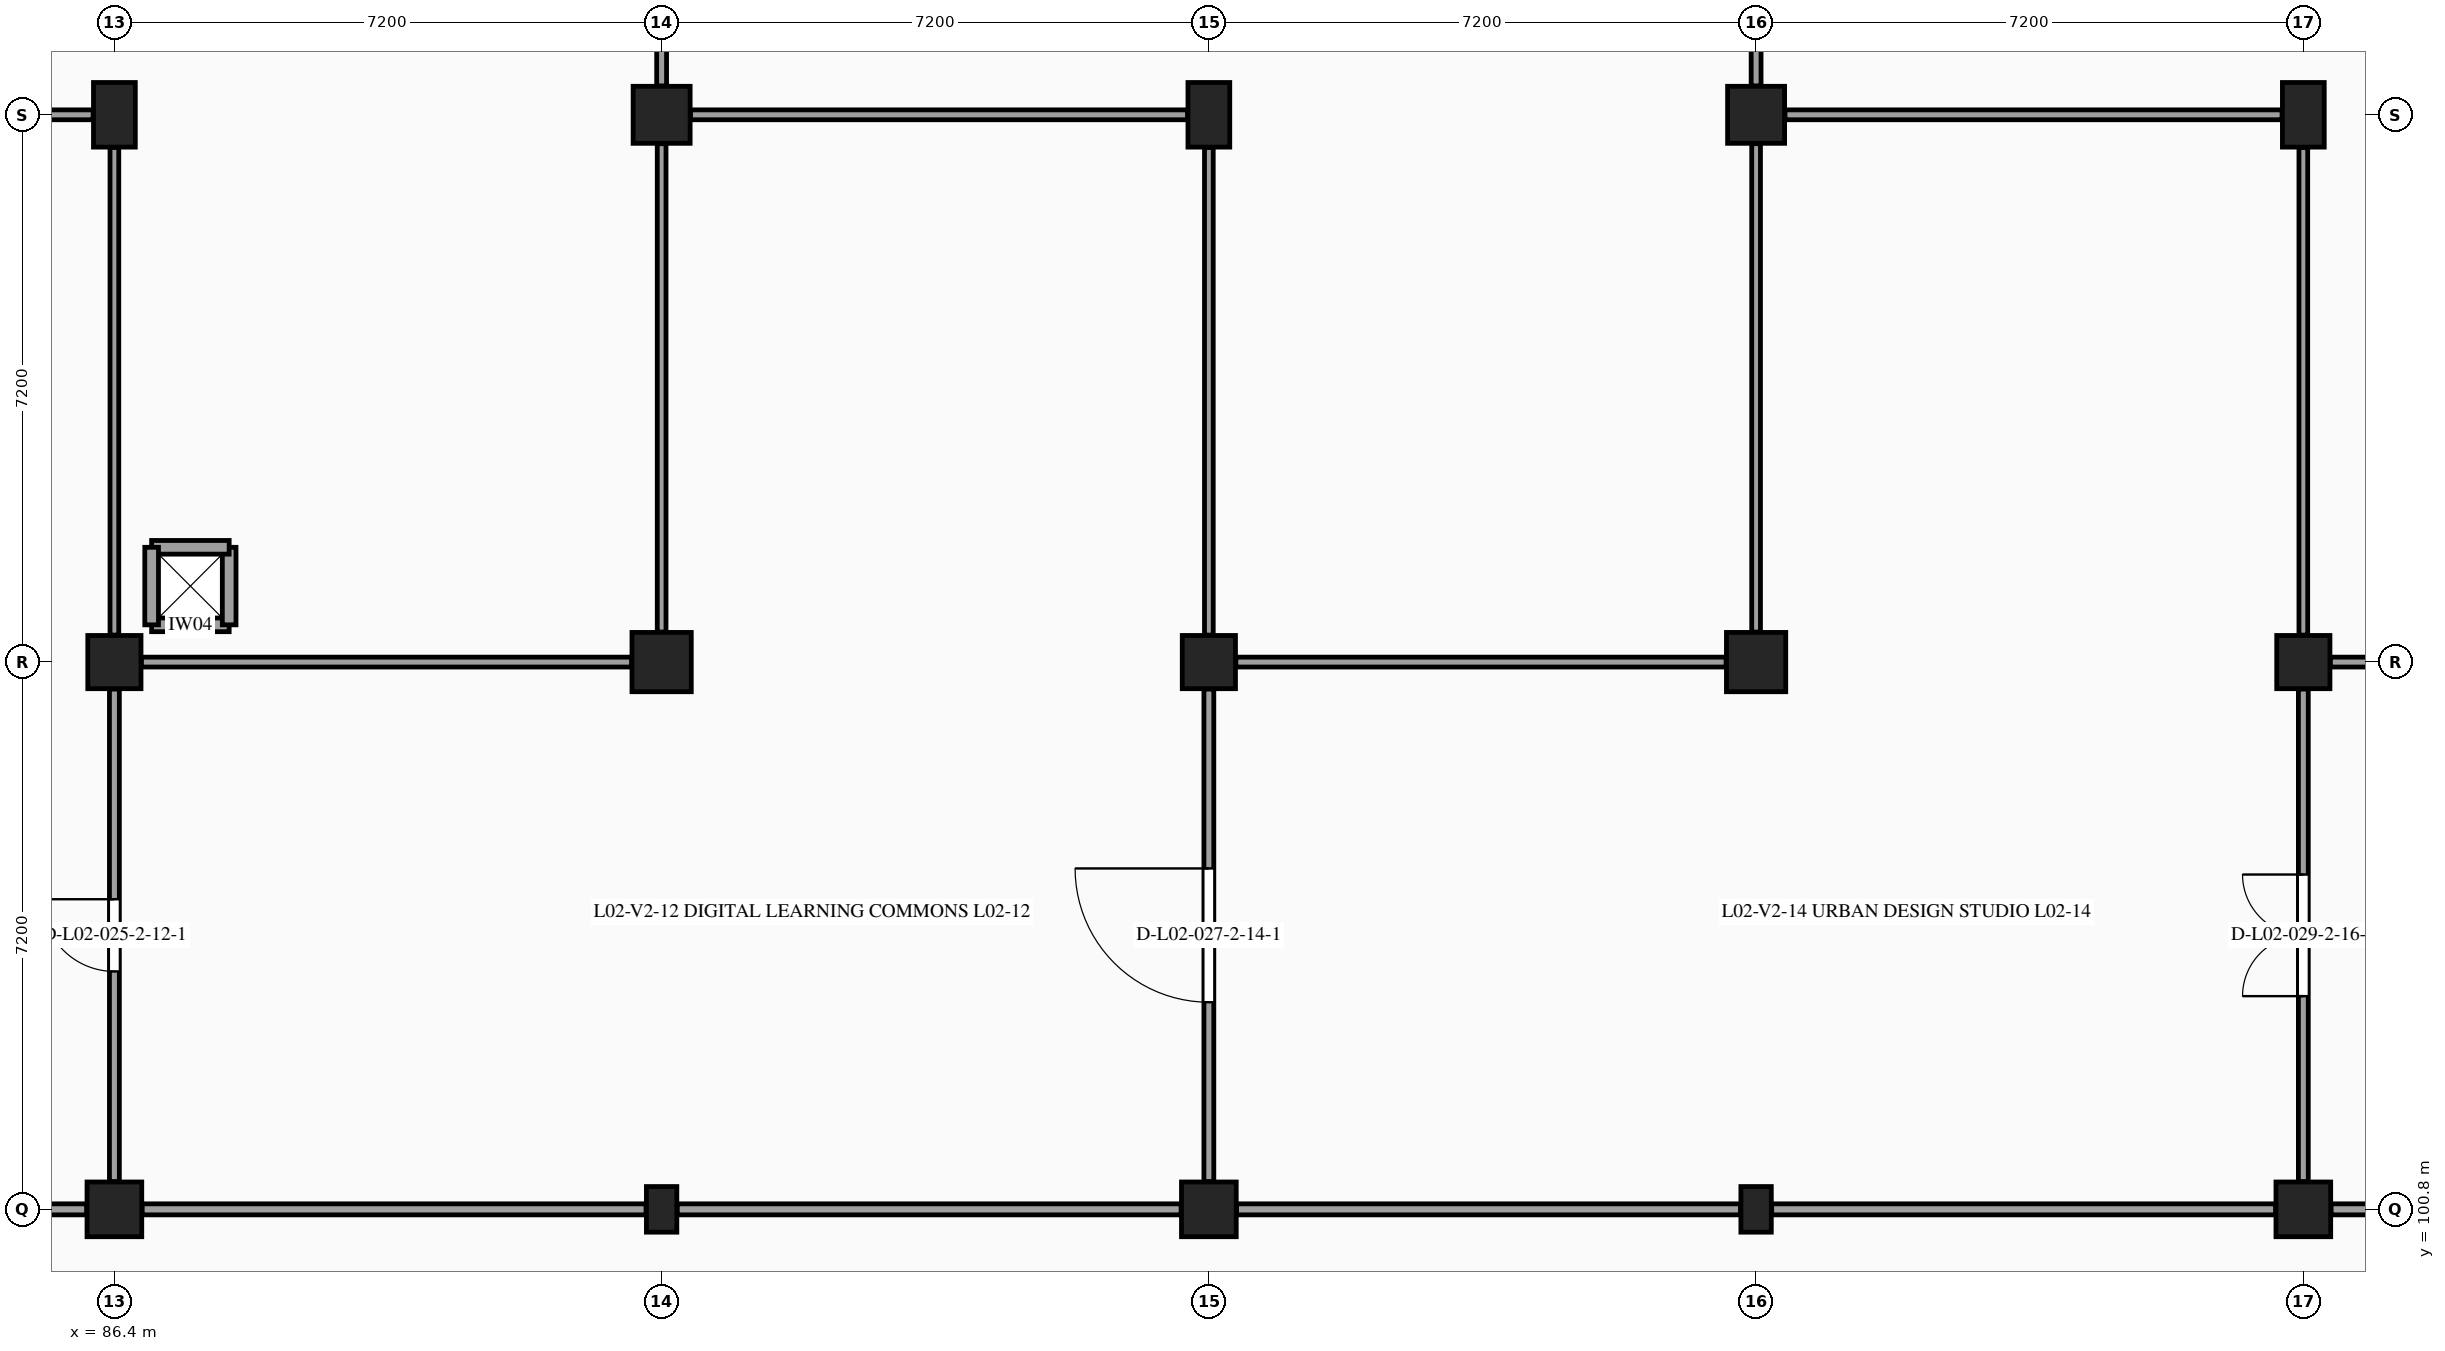
"""IFC4 building model, lengths in metres.
Left out: names, types, materials, properties, quantities, classifications, styles, units other than length and angle.
Written with IfcOpenShell. Run it as: python <this file> out.ifc"""

import sys

from ifc_helpers import new_model, si_unit, direction, frame, frame_2d, origin, origin_2d, place, context, subcontext, project, spatial, rectangle, extrude, element, fill, save


model = new_model("IFC4")
c1 = context("Model", 3, precision=1e-05, world=origin(), true_north=direction((0.0, 1.0)))
c2 = subcontext(c1, "Body", "Model", "MODEL_VIEW")
j1 = project(units=[si_unit("LENGTHUNIT", "METRE"), si_unit("PLANEANGLEUNIT", "RADIAN")], contexts=[c1])
p1 = place(None, origin())
s1 = spatial("IfcSite", under=j1, at=p1, CompositionType="ELEMENT")
p2 = place(p1, origin())
s2 = spatial("IfcBuilding", under=s1, at=p2, CompositionType="ELEMENT")
p3 = place(p2, frame((0.0, 0.0, 9.9)))
s3 = spatial("IfcBuildingStorey", under=s2, at=p3, CompositionType="ELEMENT", Elevation=9.9)
p4 = place(p3, frame((86.4, 100.8, 0.0), z_axis=(0.0, 0.0, 1.0), x_axis=(1.0, 0.0, 0.0)))
e1 = element("IfcColumn", 1, at=p4, inside=s3, PredefinedType="COLUMN", context=c2, shape_type="SweptSolid", body=[
    extrude(rectangle(XDim=0.72, YDim=0.72, at=origin_2d()), origin(), (0.0, 0.0, 1.0), 4.5),
])
p5 = place(p3, frame((86.4, 108.0, 0.0), z_axis=(0.0, 0.0, 1.0), x_axis=(1.0, 0.0, 0.0)))
e2 = element("IfcColumn", 2, at=p5, inside=s3, PredefinedType="COLUMN", context=c2, shape_type="SweptSolid", body=[
    extrude(rectangle(XDim=0.7, YDim=0.7, at=origin_2d()), origin(), (0.0, 0.0, 1.0), 4.5),
])
p6 = place(p3, frame((86.4, 115.2, 0.0), z_axis=(0.0, 0.0, 1.0), x_axis=(1.0, 0.0, 0.0)))
e3 = element("IfcColumn", 3, at=p6, inside=s3, PredefinedType="COLUMN", context=c2, shape_type="SweptSolid", body=[
    extrude(rectangle(XDim=0.55, YDim=0.85, at=origin_2d()), origin(), (0.0, 0.0, 1.0), 4.5),
])
p7 = place(p3, frame((93.6, 100.8, 0.0), z_axis=(0.0, 0.0, 1.0), x_axis=(1.0, 0.0, 0.0)))
e4 = element("IfcColumn", 4, at=p7, inside=s3, PredefinedType="PILASTER", context=c2, shape_type="SweptSolid", body=[
    extrude(rectangle(XDim=0.4, YDim=0.6, at=origin_2d()), origin(), (0.0, 0.0, 1.0), 4.5),
])
p8 = place(p3, frame((93.6, 108.0, 0.0), z_axis=(0.0, 0.0, 1.0), x_axis=(1.0, 0.0, 0.0)))
e5 = element("IfcColumn", 5, at=p8, inside=s3, PredefinedType="COLUMN", context=c2, shape_type="SweptSolid", body=[
    extrude(rectangle(XDim=0.78, YDim=0.78, at=origin_2d()), origin(), (0.0, 0.0, 1.0), 4.5),
])
p9 = place(p3, frame((93.6, 115.2, 0.0), z_axis=(0.0, 0.0, 1.0), x_axis=(1.0, 0.0, 0.0)))
e6 = element("IfcColumn", 6, at=p9, inside=s3, PredefinedType="COLUMN", context=c2, shape_type="SweptSolid", body=[
    extrude(rectangle(XDim=0.75, YDim=0.75, at=origin_2d()), origin(), (0.0, 0.0, 1.0), 4.5),
])
p10 = place(p3, frame((100.8, 100.8, 0.0), z_axis=(0.0, 0.0, 1.0), x_axis=(1.0, 0.0, 0.0)))
e7 = element("IfcColumn", 7, at=p10, inside=s3, PredefinedType="COLUMN", context=c2, shape_type="SweptSolid", body=[
    extrude(rectangle(XDim=0.72, YDim=0.72, at=origin_2d()), origin(), (0.0, 0.0, 1.0), 4.5),
])
p11 = place(p3, frame((100.8, 108.0, 0.0), z_axis=(0.0, 0.0, 1.0), x_axis=(1.0, 0.0, 0.0)))
e8 = element("IfcColumn", 8, at=p11, inside=s3, PredefinedType="COLUMN", context=c2, shape_type="SweptSolid", body=[
    extrude(rectangle(XDim=0.7, YDim=0.7, at=origin_2d()), origin(), (0.0, 0.0, 1.0), 4.5),
])
p12 = place(p3, frame((100.8, 115.2, 0.0), z_axis=(0.0, 0.0, 1.0), x_axis=(1.0, 0.0, 0.0)))
e9 = element("IfcColumn", 9, at=p12, inside=s3, PredefinedType="COLUMN", context=c2, shape_type="SweptSolid", body=[
    extrude(rectangle(XDim=0.55, YDim=0.85, at=origin_2d()), origin(), (0.0, 0.0, 1.0), 4.5),
])
p13 = place(p3, frame((108.0, 100.8, 0.0), z_axis=(0.0, 0.0, 1.0), x_axis=(1.0, 0.0, 0.0)))
e10 = element("IfcColumn", 10, at=p13, inside=s3, PredefinedType="PILASTER", context=c2, shape_type="SweptSolid", body=[
    extrude(rectangle(XDim=0.4, YDim=0.6, at=origin_2d()), origin(), (0.0, 0.0, 1.0), 4.5),
])
p14 = place(p3, frame((108.0, 108.0, 0.0), z_axis=(0.0, 0.0, 1.0), x_axis=(1.0, 0.0, 0.0)))
e11 = element("IfcColumn", 11, at=p14, inside=s3, PredefinedType="COLUMN", context=c2, shape_type="SweptSolid", body=[
    extrude(rectangle(XDim=0.78, YDim=0.78, at=origin_2d()), origin(), (0.0, 0.0, 1.0), 4.5),
])
p15 = place(p3, frame((108.0, 115.2, 0.0), z_axis=(0.0, 0.0, 1.0), x_axis=(1.0, 0.0, 0.0)))
e12 = element("IfcColumn", 12, at=p15, inside=s3, PredefinedType="COLUMN", context=c2, shape_type="SweptSolid", body=[
    extrude(rectangle(XDim=0.75, YDim=0.75, at=origin_2d()), origin(), (0.0, 0.0, 1.0), 4.5),
])
p16 = place(p3, frame((115.2, 100.8, 0.0), z_axis=(0.0, 0.0, 1.0), x_axis=(1.0, 0.0, 0.0)))
e13 = element("IfcColumn", 13, at=p16, inside=s3, PredefinedType="COLUMN", context=c2, shape_type="SweptSolid", body=[
    extrude(rectangle(XDim=0.72, YDim=0.72, at=origin_2d()), origin(), (0.0, 0.0, 1.0), 4.5),
])
p17 = place(p3, frame((115.2, 108.0, 0.0), z_axis=(0.0, 0.0, 1.0), x_axis=(1.0, 0.0, 0.0)))
e14 = element("IfcColumn", 14, at=p17, inside=s3, PredefinedType="COLUMN", context=c2, shape_type="SweptSolid", body=[
    extrude(rectangle(XDim=0.7, YDim=0.7, at=origin_2d()), origin(), (0.0, 0.0, 1.0), 4.5),
])
p18 = place(p3, frame((115.2, 115.2, 0.0), z_axis=(0.0, 0.0, 1.0), x_axis=(1.0, 0.0, 0.0)))
e15 = element("IfcColumn", 15, at=p18, inside=s3, PredefinedType="COLUMN", context=c2, shape_type="SweptSolid", body=[
    extrude(rectangle(XDim=0.55, YDim=0.85, at=origin_2d()), origin(), (0.0, 0.0, 1.0), 4.5),
])
for number, where, z_axis, x_axis in (
    (16, (86.89, 108.49, 0.0), (0.0, 0.0, 1.0), (1.0, 0.0, 0.0)),
    (17, (87.91, 108.49, 0.0), (0.0, 0.0, 1.0), (0.0, 1.0, 0.0)),
    (18, (87.91, 109.51, 0.0), (0.0, 0.0, 1.0), (-1.0, 0.0, 0.0)),
    (19, (86.89, 109.51, 0.0), (0.0, 0.0, 1.0), (0.0, -1.0, 0.0)),
):
    element("IfcWall", number, at=place(p3, frame(where, z_axis=z_axis, x_axis=x_axis)), inside=s3, PredefinedType="PARTITIONING", context=c2, shape_type="SweptSolid", body=[
        extrude(rectangle(XDim=1.02, YDim=0.18, at=frame_2d((0.51, 0.0))), origin(), (0.0, 0.0, 1.0), 4.225),
    ])
p19 = place(p3, frame((79.405, 100.8, 0.0), z_axis=(0.0, 0.0, 1.0), x_axis=(1.0, 0.0, 0.0)))
e20 = element("IfcWall", 20, at=p19, inside=s3, PredefinedType="PARTITIONING", context=c2, shape_type="SweptSolid", body=[
    extrude(rectangle(XDim=6.63, YDim=0.145, at=frame_2d((3.315, 0.0))), origin(), (0.0, 0.0, 1.0), 3.5),
])
p20 = place(p3, frame((86.4, 101.165, 0.0), z_axis=(0.0, 0.0, 1.0), x_axis=(0.0, 1.0, 0.0)))
e21 = element("IfcWall", 21, at=p20, inside=s3, PredefinedType="PARTITIONING", context=c2, shape_type="SweptSolid", body=[
    extrude(rectangle(XDim=6.48, YDim=0.13, at=frame_2d((3.24, 0.0))), origin(), (0.0, 0.0, 1.0), 3.54),
])
p21 = place(p20, frame((2.765, 0.0, 0.0)))
e22 = element("IfcOpeningElement", 22, at=p21, cuts=e21, PredefinedType="OPENING", context=c2, shape_type="SweptSolid", body=[
    extrude(rectangle(XDim=0.95, YDim=2.15, at=frame_2d((0.475, 1.075))), frame((0.0, 0.075, 0.0), z_axis=(0.0, -1.0, 0.0), x_axis=(1.0, 0.0, 0.0)), (0.0, 0.0, 1.0), 0.15),
])
p22 = place(p3, frame((86.4, 108.355, 0.0), z_axis=(0.0, 0.0, 1.0), x_axis=(0.0, 1.0, 0.0)))
e23 = element("IfcWall", 23, at=p22, inside=s3, PredefinedType="PARTITIONING", context=c2, shape_type="SweptSolid", body=[
    extrude(rectangle(XDim=6.415, YDim=0.115, at=frame_2d((3.208, 0.0))), origin(), (0.0, 0.0, 1.0), 3.535),
])
p23 = place(p3, frame((79.58, 115.2, 0.0), z_axis=(0.0, 0.0, 1.0), x_axis=(1.0, 0.0, 0.0)))
e24 = element("IfcWall", 24, at=p23, inside=s3, PredefinedType="PARTITIONING", context=c2, shape_type="SweptSolid", body=[
    extrude(rectangle(XDim=6.54, YDim=0.13, at=frame_2d((3.27, 0.0))), origin(), (0.0, 0.0, 1.0), 3.5),
])
p24 = place(p3, frame((86.765, 100.8, 0.0), z_axis=(0.0, 0.0, 1.0), x_axis=(1.0, 0.0, 0.0)))
e25 = element("IfcWall", 25, at=p24, inside=s3, PredefinedType="PARTITIONING", context=c2, shape_type="SweptSolid", body=[
    extrude(rectangle(XDim=6.63, YDim=0.145, at=frame_2d((3.315, 0.0))), origin(), (0.0, 0.0, 1.0), 3.505),
])
p25 = place(p3, frame((86.755, 108.0, 0.0), z_axis=(0.0, 0.0, 1.0), x_axis=(1.0, 0.0, 0.0)))
e26 = element("IfcWall", 26, at=p25, inside=s3, PredefinedType="PARTITIONING", context=c2, shape_type="SweptSolid", body=[
    extrude(rectangle(XDim=6.45, YDim=0.13, at=frame_2d((3.225, 0.0))), origin(), (0.0, 0.0, 1.0), 3.505),
])
p26 = place(p3, frame((93.6, 108.395, 0.0), z_axis=(0.0, 0.0, 1.0), x_axis=(0.0, 1.0, 0.0)))
e27 = element("IfcWall", 27, at=p26, inside=s3, PredefinedType="PARTITIONING", context=c2, shape_type="SweptSolid", body=[
    extrude(rectangle(XDim=6.425, YDim=0.115, at=frame_2d((3.212, 0.0))), origin(), (0.0, 0.0, 1.0), 3.535),
])
p27 = place(p3, frame((93.6, 115.58, 0.0), z_axis=(0.0, 0.0, 1.0), x_axis=(0.0, 1.0, 0.0)))
e28 = element("IfcWall", 28, at=p27, inside=s3, PredefinedType="PARTITIONING", context=c2, shape_type="SweptSolid", body=[
    extrude(rectangle(XDim=6.455, YDim=0.13, at=frame_2d((3.228, 0.0))), origin(), (0.0, 0.0, 1.0), 3.53),
])
p28 = place(p27, frame((2.268, 0.0, 0.0)))
e29 = element("IfcOpeningElement", 29, at=p28, cuts=e28, PredefinedType="OPENING", context=c2, shape_type="SweptSolid", body=[
    extrude(rectangle(XDim=1.92, YDim=2.35, at=frame_2d((0.96, 1.175))), frame((0.0, 0.075, 0.0), z_axis=(0.0, -1.0, 0.0), x_axis=(1.0, 0.0, 0.0)), (0.0, 0.0, 1.0), 0.15),
])
p29 = place(p3, frame((93.805, 100.8, 0.0), z_axis=(0.0, 0.0, 1.0), x_axis=(1.0, 0.0, 0.0)))
e30 = element("IfcWall", 30, at=p29, inside=s3, PredefinedType="PARTITIONING", context=c2, shape_type="SweptSolid", body=[
    extrude(rectangle(XDim=6.63, YDim=0.145, at=frame_2d((3.315, 0.0))), origin(), (0.0, 0.0, 1.0), 3.525),
])
p30 = place(p3, frame((100.8, 101.165, 0.0), z_axis=(0.0, 0.0, 1.0), x_axis=(0.0, 1.0, 0.0)))
e31 = element("IfcWall", 31, at=p30, inside=s3, PredefinedType="PARTITIONING", context=c2, shape_type="SweptSolid", body=[
    extrude(rectangle(XDim=6.48, YDim=0.13, at=frame_2d((3.24, 0.0))), origin(), (0.0, 0.0, 1.0), 3.54),
])
p31 = place(p30, frame((2.36, 0.0, 0.0)))
e32 = element("IfcOpeningElement", 32, at=p31, cuts=e31, PredefinedType="OPENING", context=c2, shape_type="SweptSolid", body=[
    extrude(rectangle(XDim=1.76, YDim=2.3, at=frame_2d((0.88, 1.15))), frame((0.0, 0.075, 0.0), z_axis=(0.0, -1.0, 0.0), x_axis=(1.0, 0.0, 0.0)), (0.0, 0.0, 1.0), 0.15),
])
p32 = place(p3, frame((100.8, 108.355, 0.0), z_axis=(0.0, 0.0, 1.0), x_axis=(0.0, 1.0, 0.0)))
e33 = element("IfcWall", 33, at=p32, inside=s3, PredefinedType="PARTITIONING", context=c2, shape_type="SweptSolid", body=[
    extrude(rectangle(XDim=6.415, YDim=0.115, at=frame_2d((3.208, 0.0))), origin(), (0.0, 0.0, 1.0), 3.535),
])
p33 = place(p3, frame((93.98, 115.2, 0.0), z_axis=(0.0, 0.0, 1.0), x_axis=(1.0, 0.0, 0.0)))
e34 = element("IfcWall", 34, at=p33, inside=s3, PredefinedType="PARTITIONING", context=c2, shape_type="SweptSolid", body=[
    extrude(rectangle(XDim=6.54, YDim=0.13, at=frame_2d((3.27, 0.0))), origin(), (0.0, 0.0, 1.0), 3.525),
])
p34 = place(p3, frame((101.165, 100.8, 0.0), z_axis=(0.0, 0.0, 1.0), x_axis=(1.0, 0.0, 0.0)))
e35 = element("IfcWall", 35, at=p34, inside=s3, PredefinedType="PARTITIONING", context=c2, shape_type="SweptSolid", body=[
    extrude(rectangle(XDim=6.63, YDim=0.145, at=frame_2d((3.315, 0.0))), origin(), (0.0, 0.0, 1.0), 3.565),
])
p35 = place(p3, frame((101.155, 108.0, 0.0), z_axis=(0.0, 0.0, 1.0), x_axis=(1.0, 0.0, 0.0)))
e36 = element("IfcWall", 36, at=p35, inside=s3, PredefinedType="PARTITIONING", context=c2, shape_type="SweptSolid", body=[
    extrude(rectangle(XDim=6.45, YDim=0.13, at=frame_2d((3.225, 0.0))), origin(), (0.0, 0.0, 1.0), 3.565),
])
p36 = place(p3, frame((108.0, 108.395, 0.0), z_axis=(0.0, 0.0, 1.0), x_axis=(0.0, 1.0, 0.0)))
e37 = element("IfcWall", 37, at=p36, inside=s3, PredefinedType="PARTITIONING", context=c2, shape_type="SweptSolid", body=[
    extrude(rectangle(XDim=6.425, YDim=0.115, at=frame_2d((3.212, 0.0))), origin(), (0.0, 0.0, 1.0), 3.535),
])
p37 = place(p3, frame((108.0, 115.58, 0.0), z_axis=(0.0, 0.0, 1.0), x_axis=(0.0, 1.0, 0.0)))
e38 = element("IfcWall", 38, at=p37, inside=s3, PredefinedType="PARTITIONING", context=c2, shape_type="SweptSolid", body=[
    extrude(rectangle(XDim=6.455, YDim=0.13, at=frame_2d((3.228, 0.0))), origin(), (0.0, 0.0, 1.0), 3.53),
])
p38 = place(p37, frame((2.427, 0.0, 0.0)))
e39 = element("IfcOpeningElement", 39, at=p38, cuts=e38, PredefinedType="OPENING", context=c2, shape_type="SweptSolid", body=[
    extrude(rectangle(XDim=1.6, YDim=2.2, at=frame_2d((0.8, 1.1))), frame((0.0, 0.075, 0.0), z_axis=(0.0, -1.0, 0.0), x_axis=(1.0, 0.0, 0.0)), (0.0, 0.0, 1.0), 0.15),
])
p39 = place(p3, frame((108.205, 100.8, 0.0), z_axis=(0.0, 0.0, 1.0), x_axis=(1.0, 0.0, 0.0)))
e40 = element("IfcWall", 40, at=p39, inside=s3, PredefinedType="PARTITIONING", context=c2, shape_type="SweptSolid", body=[
    extrude(rectangle(XDim=6.63, YDim=0.145, at=frame_2d((3.315, 0.0))), origin(), (0.0, 0.0, 1.0), 3.575),
])
p40 = place(p3, frame((115.2, 101.165, 0.0), z_axis=(0.0, 0.0, 1.0), x_axis=(0.0, 1.0, 0.0)))
e41 = element("IfcWall", 41, at=p40, inside=s3, PredefinedType="PARTITIONING", context=c2, shape_type="SweptSolid", body=[
    extrude(rectangle(XDim=6.48, YDim=0.13, at=frame_2d((3.24, 0.0))), origin(), (0.0, 0.0, 1.0), 3.53),
])
p41 = place(p40, frame((2.44, 0.0, 0.0)))
e42 = element("IfcOpeningElement", 42, at=p41, cuts=e41, PredefinedType="OPENING", context=c2, shape_type="SweptSolid", body=[
    extrude(rectangle(XDim=1.6, YDim=2.2, at=frame_2d((0.8, 1.1))), frame((0.0, 0.075, 0.0), z_axis=(0.0, -1.0, 0.0), x_axis=(1.0, 0.0, 0.0)), (0.0, 0.0, 1.0), 0.15),
])
p42 = place(p3, frame((115.2, 108.355, 0.0), z_axis=(0.0, 0.0, 1.0), x_axis=(0.0, 1.0, 0.0)))
e43 = element("IfcWall", 43, at=p42, inside=s3, PredefinedType="PARTITIONING", context=c2, shape_type="SweptSolid", body=[
    extrude(rectangle(XDim=6.415, YDim=0.115, at=frame_2d((3.208, 0.0))), origin(), (0.0, 0.0, 1.0), 3.525),
])
p43 = place(p3, frame((108.38, 115.2, 0.0), z_axis=(0.0, 0.0, 1.0), x_axis=(1.0, 0.0, 0.0)))
e44 = element("IfcWall", 44, at=p43, inside=s3, PredefinedType="PARTITIONING", context=c2, shape_type="SweptSolid", body=[
    extrude(rectangle(XDim=6.54, YDim=0.13, at=frame_2d((3.27, 0.0))), origin(), (0.0, 0.0, 1.0), 3.575),
])
p44 = place(p3, frame((115.565, 100.8, 0.0), z_axis=(0.0, 0.0, 1.0), x_axis=(1.0, 0.0, 0.0)))
e45 = element("IfcWall", 45, at=p44, inside=s3, PredefinedType="PARTITIONING", context=c2, shape_type="SweptSolid", body=[
    extrude(rectangle(XDim=6.63, YDim=0.145, at=frame_2d((3.315, 0.0))), origin(), (0.0, 0.0, 1.0), 3.575),
])
p45 = place(p3, frame((115.555, 108.0, 0.0), z_axis=(0.0, 0.0, 1.0), x_axis=(1.0, 0.0, 0.0)))
e46 = element("IfcWall", 46, at=p45, inside=s3, PredefinedType="PARTITIONING", context=c2, shape_type="SweptSolid", body=[
    extrude(rectangle(XDim=6.45, YDim=0.13, at=frame_2d((3.225, 0.0))), origin(), (0.0, 0.0, 1.0), 3.575),
])
p46 = place(p21, origin())
e47 = element("IfcDoor", 47, at=p46, inside=s3, OperationType="SINGLE_SWING_RIGHT", PredefinedType="DOOR", context=c2, shape_type="SweptSolid", body=[
    extrude(rectangle(XDim=0.95, YDim=2.15, at=frame_2d((0.475, 1.075))), frame((0.0, 0.025, 0.0), z_axis=(0.0, -1.0, 0.0), x_axis=(1.0, 0.0, 0.0)), (0.0, 0.0, 1.0), 0.05),
])
fill(e22, e47)
p47 = place(p31, origin())
e48 = element("IfcDoor", 48, at=p47, inside=s3, OperationType="SINGLE_SWING_RIGHT", PredefinedType="DOOR", context=c2, shape_type="SweptSolid", body=[
    extrude(rectangle(XDim=1.76, YDim=2.3, at=frame_2d((0.88, 1.15))), frame((0.0, 0.025, 0.0), z_axis=(0.0, -1.0, 0.0), x_axis=(1.0, 0.0, 0.0)), (0.0, 0.0, 1.0), 0.05),
])
fill(e32, e48)
p48 = place(p41, origin())
e49 = element("IfcDoor", 49, at=p48, inside=s3, OperationType="DOUBLE_DOOR_SINGLE_SWING", PredefinedType="DOOR", context=c2, shape_type="SweptSolid", body=[
    extrude(rectangle(XDim=1.6, YDim=2.2, at=frame_2d((0.8, 1.1))), frame((0.0, 0.025, 0.0), z_axis=(0.0, -1.0, 0.0), x_axis=(1.0, 0.0, 0.0)), (0.0, 0.0, 1.0), 0.05),
])
fill(e42, e49)
save(model, sys.argv[1])
